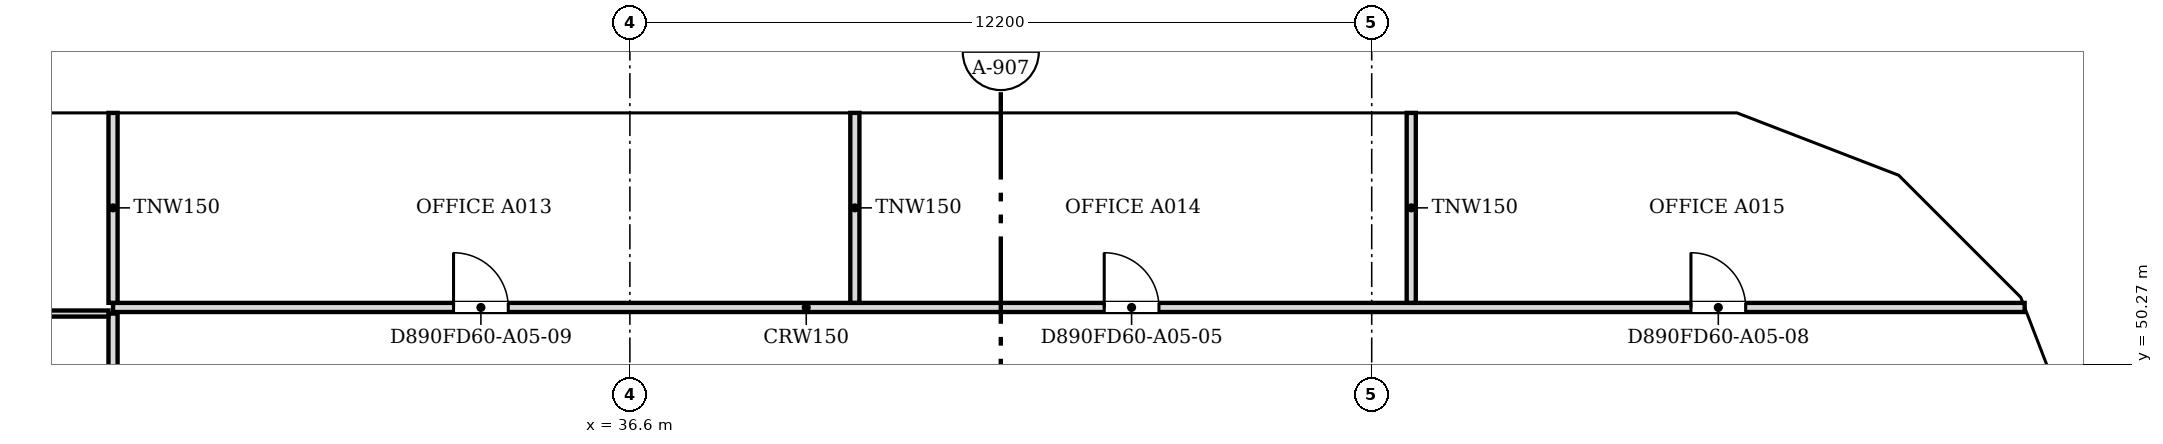
"""IFC4 building model, lengths in metres.
Left out: names, types, materials, properties, quantities, classifications, styles, units other than length and angle.
Written with IfcOpenShell. Run it as: python <this file> out.ifc"""

import sys

from ifc_helpers import new_model, si_unit, direction, frame, frame_2d, origin, place, context, subcontext, project, spatial, polyline, rectangle, outline, extrude, faceted_brep, source, transform, mapped, element, fill, save


model = new_model("IFC4")
c1 = context("Model", 3, precision=1e-05, world=origin(), true_north=direction((0.0, 1.0)))
c2 = subcontext(c1, "Body", "Model", "MODEL_VIEW")
j1 = project(units=[si_unit("LENGTHUNIT", "METRE"), si_unit("PLANEANGLEUNIT", "RADIAN")], contexts=[c1])
p1 = place(None, origin())
s1 = spatial("IfcSite", under=j1, at=p1, CompositionType="ELEMENT")
p2 = place(p1, origin())
s2 = spatial("IfcBuilding", under=s1, at=p2, CompositionType="ELEMENT")
p3 = place(p2, frame((0.0, 0.0, 60.0)))
s3 = spatial("IfcBuildingStorey", under=s2, at=p3, CompositionType="ELEMENT", Elevation=60.0)
m1 = source(origin(), c2, "Body", "Brep", [
    faceted_brep([(0.047, -0.25, 0.0), (2.997, -0.25, 3.8), (0.047, -0.25, 7.6), (0.0, -0.25, 7.541), (0.0, -0.25, 0.059), (0.093, 0.25, 7.54), (2.944, 0.25, 3.868), (2.944, 0.25, 3.732), (0.093, 0.25, 0.06), (2.997, 0.0, 3.8), (0.047, 0.0, 0.0), (0.047, 0.0, 7.6)], [[[0, 1, 2, 3, 4]], [[5, 6, 7, 8]], [[8, 7, 9, 1, 0, 10]], [[6, 5, 11, 2, 1, 9]], [[3, 2, 11]], [[10, 0, 4]], [[8, 10, 4, 3, 11, 5]], [[9, 7, 6]]]),
])
p4 = place(p3, frame((60.767, 48.71, -3.8), z_axis=(0.0, 0.0, 1.0), x_axis=(-0.359901446078, 0.932990326376, 0.0)))
e1 = element("IfcWall", 1, at=p4, inside=s3, PredefinedType="SOLIDWALL", context=c2, shape_type="MappedRepresentation", body=[
    mapped(m1, transform((0.0, 0.0, 0.0), scale=1.0)),
])
m2 = source(origin(), c2, "Body", "SweptSolid", [
    extrude(outline(polyline([(0.247, 0.665), (2.681, 3.8), (0.247, 6.935), (0.247, 0.665)])), frame((0.0, 0.26, 0.0), z_axis=(0.0, -1.0, 0.0), x_axis=(1.0, 0.0, 0.0)), (0.0, 0.0, 1.0), 0.52),
])
p5 = place(p4, origin())
e2 = element("IfcOpeningElement", 2, at=p5, cuts=e1, PredefinedType="OPENING", context=c2, shape_type="MappedRepresentation", body=[
    mapped(m2, transform((0.0, 0.0, 0.0), scale=1.0)),
])
m3 = source(origin(), c2, "Body", "Brep", [
    faceted_brep([(2.944, -0.25, 0.0), (2.997, -0.25, 0.068), (2.997, -0.25, 7.532), (2.944, -0.25, 7.6), (0.0, -0.25, 3.8), (0.053, 0.25, 3.868), (2.891, 0.25, 7.532), (2.891, 0.25, 0.068), (0.053, 0.25, 3.732), (2.944, 0.0, 0.0), (2.944, 0.0, 7.6), (0.0, 0.0, 3.8)], [[[0, 1, 2, 3, 4]], [[5, 6, 7, 8]], [[1, 0, 9]], [[10, 3, 2]], [[6, 5, 11, 4, 3, 10]], [[8, 7, 9, 0, 4, 11]], [[8, 11, 5]], [[1, 9, 7, 6, 10, 2]]]),
])
p6 = place(p3, frame((59.688, 51.506, -3.8), z_axis=(0.0, 0.0, 1.0), x_axis=(-0.707106781187, 0.707106781187, 0.0)))
e3 = element("IfcWall", 3, at=p6, inside=s3, PredefinedType="SOLIDWALL", context=c2, shape_type="MappedRepresentation", body=[
    mapped(m3, transform((0.0, 0.0, 0.0), scale=1.0)),
])
m4 = source(origin(), c2, "Body", "SweptSolid", [
    extrude(outline(polyline([(2.744, 6.934), (0.316, 3.8), (2.744, 0.666), (2.744, 6.934)])), frame((0.0, 0.26, 0.0), z_axis=(0.0, -1.0, 0.0), x_axis=(1.0, 0.0, 0.0)), (0.0, 0.0, 1.0), 0.52),
])
p7 = place(p6, origin())
e4 = element("IfcOpeningElement", 4, at=p7, cuts=e3, PredefinedType="OPENING", context=c2, shape_type="MappedRepresentation", body=[
    mapped(m4, transform((0.0, 0.0, 0.0), scale=1.0)),
])
m5 = source(origin(), c2, "Body", "Brep", [
    faceted_brep([(0.053, -0.25, 0.0), (3.003, -0.25, 3.8), (0.053, -0.25, 7.6), (0.0, -0.25, 7.532), (0.0, -0.25, 0.068), (0.106, 0.25, 7.532), (2.957, 0.25, 3.86), (2.957, 0.25, 3.74), (0.106, 0.25, 0.068), (3.003, 0.0, 3.8), (0.053, 0.0, 0.0), (0.053, 0.0, 7.6)], [[[0, 1, 2, 3, 4]], [[5, 6, 7, 8]], [[8, 7, 9, 1, 0, 10]], [[6, 5, 11, 2, 1, 9]], [[3, 2, 11]], [[10, 0, 4]], [[8, 10, 4, 3, 11, 5]], [[9, 7, 6]]]),
])
p8 = place(p3, frame((57.656, 53.569, -3.8), z_axis=(0.0, 0.0, 1.0), x_axis=(-0.933007896601, 0.359855894603, 0.0)))
e5 = element("IfcWall", 5, at=p8, inside=s3, PredefinedType="SOLIDWALL", context=c2, shape_type="MappedRepresentation", body=[
    mapped(m5, transform((0.0, 0.0, 0.0), scale=1.0)),
])
m6 = source(origin(), c2, "Body", "SweptSolid", [
    extrude(outline(polyline([(0.253, 0.665), (2.687, 3.8), (0.253, 6.935), (0.253, 0.665)])), frame((0.0, 0.26, 0.0), z_axis=(0.0, -1.0, 0.0), x_axis=(1.0, 0.0, 0.0)), (0.0, 0.0, 1.0), 0.52),
])
p9 = place(p8, origin())
e6 = element("IfcOpeningElement", 6, at=p9, cuts=e5, PredefinedType="OPENING", context=c2, shape_type="MappedRepresentation", body=[
    mapped(m6, transform((0.0, 0.0, 0.0), scale=1.0)),
])
m7 = source(origin(), c2, "Body", "Brep", [
    faceted_brep([(3.003, -0.25, 0.0), (6.053, -0.25, 3.8), (3.003, -0.25, 7.6), (0.0, -0.25, 3.8), (0.047, 0.25, 3.859), (3.003, 0.25, 7.6), (6.053, 0.25, 3.8), (3.003, 0.25, 0.0), (0.047, 0.25, 3.741), (0.0, 0.0, 3.8)], [[[0, 1, 2, 3]], [[4, 5, 6, 7, 8]], [[7, 6, 1, 0]], [[6, 5, 2, 1]], [[5, 4, 9, 3, 2]], [[8, 7, 0, 3, 9]], [[8, 9, 4]]]),
])
p10 = place(p3, frame((54.854, 54.65, -3.8), z_axis=(0.0, 0.0, 1.0), x_axis=(-1.0, 0.0, 0.0)))
e7 = element("IfcWall", 7, at=p10, inside=s3, PredefinedType="SOLIDWALL", context=c2, shape_type="MappedRepresentation", body=[
    mapped(m7, transform((0.0, 0.0, 0.0), scale=1.0)),
])
m8 = source(origin(), c2, "Body", "SweptSolid", [
    extrude(outline(polyline([(3.005, 0.401), (5.733, 3.8), (3.005, 7.199), (0.319, 3.8), (3.005, 0.401)])), frame((0.0, 0.26, 0.0), z_axis=(0.0, -1.0, 0.0), x_axis=(1.0, 0.0, 0.0)), (0.0, 0.0, 1.0), 0.52),
])
p11 = place(p10, origin())
e8 = element("IfcOpeningElement", 8, at=p11, cuts=e7, PredefinedType="OPENING", context=c2, shape_type="MappedRepresentation", body=[
    mapped(m8, transform((0.0, 0.0, 0.0), scale=1.0)),
])
m9 = source(origin(), c2, "Body", "SweptSolid", [
    extrude(outline(polyline([(3.05, 0.0), (6.1, 3.8), (3.05, 7.6), (0.0, 3.8), (3.05, 0.0)])), frame((0.0, 0.25, 0.0), z_axis=(0.0, -1.0, 0.0), x_axis=(1.0, 0.0, 0.0)), (0.0, 0.0, 1.0), 0.5),
])
p12 = place(p3, frame((48.8, 54.65, -3.8), z_axis=(0.0, 0.0, 1.0), x_axis=(-1.0, 0.0, 0.0)))
e9 = element("IfcWall", 9, at=p12, inside=s3, PredefinedType="SOLIDWALL", context=c2, shape_type="MappedRepresentation", body=[
    mapped(m9, transform((0.0, 0.0, 0.0), scale=1.0)),
])
m10 = source(origin(), c2, "Body", "SweptSolid", [
    extrude(outline(polyline([(3.05, 0.399), (5.78, 3.8), (3.05, 7.201), (0.321, 3.8), (3.05, 0.399)])), frame((0.0, 0.26, 0.0), z_axis=(0.0, -1.0, 0.0), x_axis=(1.0, 0.0, 0.0)), (0.0, 0.0, 1.0), 0.52),
])
p13 = place(p12, origin())
e10 = element("IfcOpeningElement", 10, at=p13, cuts=e9, PredefinedType="OPENING", context=c2, shape_type="MappedRepresentation", body=[
    mapped(m10, transform((0.0, 0.0, 0.0), scale=1.0)),
])
m11 = source(origin(), c2, "Body", "Brep", [
    faceted_brep([(3.05, -0.25, 0.0), (6.1, -0.25, 3.8), (6.1, -0.25, 3.8), (3.05, -0.25, 7.6), (0.0, -0.25, 3.8), (0.0, 0.25, 3.8), (3.05, 0.25, 7.6), (6.1, 0.25, 3.8), (6.1, 0.25, 3.8), (3.05, 0.25, 0.0)], [[[0, 1, 2, 3, 4]], [[5, 6, 7, 8, 9]], [[9, 8, 1, 0]], [[7, 6, 3, 2]], [[6, 5, 4, 3]], [[5, 9, 0, 4]], [[1, 8, 7, 2]]]),
])
p14 = place(p3, frame((42.7, 54.65, -3.8), z_axis=(0.0, 0.0, 1.0), x_axis=(-1.0, 0.0, 0.0)))
e11 = element("IfcWall", 11, at=p14, inside=s3, PredefinedType="SOLIDWALL", context=c2, shape_type="MappedRepresentation", body=[
    mapped(m11, transform((0.0, 0.0, 0.0), scale=1.0)),
])
p15 = place(p14, origin())
e12 = element("IfcOpeningElement", 12, at=p15, cuts=e11, PredefinedType="OPENING", context=c2, shape_type="MappedRepresentation", body=[
    mapped(m10, transform((0.0, 0.0, 0.0), scale=1.0)),
])
p16 = place(p3, frame((36.6, 54.65, -3.8), z_axis=(0.0, 0.0, 1.0), x_axis=(-1.0, 0.0, 0.0)))
e13 = element("IfcWall", 13, at=p16, inside=s3, PredefinedType="SOLIDWALL", context=c2, shape_type="MappedRepresentation", body=[
    mapped(m9, transform((0.0, 0.0, 0.0), scale=1.0)),
])
p17 = place(p16, origin())
e14 = element("IfcOpeningElement", 14, at=p17, cuts=e13, PredefinedType="OPENING", context=c2, shape_type="MappedRepresentation", body=[
    mapped(m10, transform((0.0, 0.0, 0.0), scale=1.0)),
])
p18 = place(p3, frame((30.5, 54.65, -3.8), z_axis=(0.0, 0.0, 1.0), x_axis=(-1.0, 0.0, 0.0)))
e15 = element("IfcWall", 15, at=p18, inside=s3, PredefinedType="SOLIDWALL", context=c2, shape_type="MappedRepresentation", body=[
    mapped(m9, transform((0.0, 0.0, 0.0), scale=1.0)),
])
p19 = place(p18, origin())
e16 = element("IfcOpeningElement", 16, at=p19, cuts=e15, PredefinedType="OPENING", context=c2, shape_type="MappedRepresentation", body=[
    mapped(m10, transform((0.0, 0.0, 0.0), scale=1.0)),
])
m12 = source(origin(), c2, "Body", "Brep", [
    faceted_brep([(2.95, -0.25, 0.0), (3.003, -0.25, 0.068), (3.003, -0.25, 3.8), (0.0, -0.25, 3.8), (0.047, 0.25, 3.8), (2.898, 0.25, 3.8), (2.898, 0.25, 0.068), (0.047, 0.25, 3.74), (2.95, 0.0, 0.0), (0.0, 0.0, 3.8)], [[[0, 1, 2, 3]], [[4, 5, 6, 7]], [[1, 0, 8]], [[5, 4, 9, 3, 2]], [[7, 6, 8, 0, 3, 9]], [[7, 9, 4]], [[1, 8, 6, 5, 2]]]),
])
p20 = place(p3, frame((60.75, 48.753, 0.0), z_axis=(0.0, 0.0, 1.0), x_axis=(-0.35992665181, 0.932980602862, 0.0)))
e17 = element("IfcWall", 17, at=p20, inside=s3, PredefinedType="SOLIDWALL", context=c2, shape_type="MappedRepresentation", body=[
    mapped(m12, transform((0.0, 0.0, 0.0), scale=1.0)),
])
m13 = source(origin(), c2, "Body", "SweptSolid", [
    extrude(outline(polyline([(2.75, 3.55), (0.511, 3.55), (2.75, 0.665), (2.75, 3.55)])), frame((0.0, 0.26, 0.0), z_axis=(0.0, -1.0, 0.0), x_axis=(1.0, 0.0, 0.0)), (0.0, 0.0, 1.0), 0.52),
])
p21 = place(p20, origin())
e18 = element("IfcOpeningElement", 18, at=p21, cuts=e17, PredefinedType="OPENING", context=c2, shape_type="MappedRepresentation", body=[
    mapped(m13, transform((0.0, 0.0, 0.0), scale=1.0)),
])
m14 = source(origin(), c2, "Body", "Brep", [
    faceted_brep([(0.053, -0.25, 0.0), (2.997, -0.25, 3.8), (0.0, -0.25, 3.8), (0.0, -0.25, 0.068), (0.106, 0.25, 3.8), (2.944, 0.25, 3.8), (2.944, 0.25, 3.732), (0.106, 0.25, 0.068), (2.997, 0.0, 3.8), (0.053, 0.0, 0.0)], [[[0, 1, 2, 3]], [[4, 5, 6, 7]], [[7, 6, 8, 1, 0, 9]], [[5, 4, 2, 1, 8]], [[9, 0, 3]], [[7, 9, 3, 2, 4]], [[6, 5, 8]]]),
])
p22 = place(p3, frame((59.726, 51.469, 0.0), z_axis=(0.0, 0.0, 1.0), x_axis=(-0.707106781187, 0.707106781187, 0.0)))
e19 = element("IfcWall", 19, at=p22, inside=s3, PredefinedType="SOLIDWALL", context=c2, shape_type="MappedRepresentation", body=[
    mapped(m14, transform((0.0, 0.0, 0.0), scale=1.0)),
])
m15 = source(origin(), c2, "Body", "SweptSolid", [
    extrude(outline(polyline([(0.253, 0.666), (2.487, 3.55), (0.253, 3.55), (0.253, 0.666)])), frame((0.0, 0.26, 0.0), z_axis=(0.0, -1.0, 0.0), x_axis=(1.0, 0.0, 0.0)), (0.0, 0.0, 1.0), 0.52),
])
p23 = place(p22, origin())
e20 = element("IfcOpeningElement", 20, at=p23, cuts=e19, PredefinedType="OPENING", context=c2, shape_type="MappedRepresentation", body=[
    mapped(m15, transform((0.0, 0.0, 0.0), scale=1.0)),
])
m16 = source(origin(), c2, "Body", "Brep", [
    faceted_brep([(2.95, -0.25, 0.0), (2.997, -0.25, 0.059), (2.997, -0.25, 3.8), (0.0, -0.25, 3.8), (0.053, 0.25, 3.8), (2.904, 0.25, 3.8), (2.904, 0.25, 0.06), (0.053, 0.25, 3.732), (2.95, 0.0, 0.0), (0.0, 0.0, 3.8)], [[[0, 1, 2, 3]], [[4, 5, 6, 7]], [[1, 0, 8]], [[5, 4, 9, 3, 2]], [[7, 6, 8, 0, 3, 9]], [[7, 9, 4]], [[1, 8, 6, 5, 2]]]),
])
p24 = place(p3, frame((57.606, 53.588, 0.0), z_axis=(0.0, 0.0, 1.0), x_axis=(-0.932990326376, 0.359901446078, 0.0)))
e21 = element("IfcWall", 21, at=p24, inside=s3, PredefinedType="SOLIDWALL", context=c2, shape_type="MappedRepresentation", body=[
    mapped(m16, transform((0.0, 0.0, 0.0), scale=1.0)),
])
p25 = place(p24, origin())
e22 = element("IfcOpeningElement", 22, at=p25, cuts=e21, PredefinedType="OPENING", context=c2, shape_type="MappedRepresentation", body=[
    mapped(m13, transform((0.0, 0.0, 0.0), scale=1.0)),
])
m17 = source(origin(), c2, "Body", "Brep", [
    faceted_brep([(0.047, -0.25, 0.0), (3.05, -0.25, 3.8), (0.0, -0.25, 3.8), (0.0, -0.25, 0.06), (0.093, 0.25, 3.8), (3.05, 0.25, 3.8), (0.093, 0.25, 0.059), (0.047, 0.0, 0.0)], [[[0, 1, 2, 3]], [[4, 5, 6]], [[6, 5, 1, 0, 7]], [[5, 4, 2, 1]], [[7, 0, 3]], [[6, 7, 3, 2, 4]]]),
])
p26 = place(p3, frame((54.9, 54.65, 0.0), z_axis=(0.0, 0.0, 1.0), x_axis=(-1.0, 0.0, 0.0)))
e23 = element("IfcWall", 23, at=p26, inside=s3, PredefinedType="SOLIDWALL", context=c2, shape_type="MappedRepresentation", body=[
    mapped(m17, transform((0.0, 0.0, 0.0), scale=1.0)),
])
m18 = source(origin(), c2, "Body", "SweptSolid", [
    extrude(outline(polyline([(0.247, 0.656), (2.534, 3.55), (0.247, 3.55), (0.247, 0.656)])), frame((0.0, 0.26, 0.0), z_axis=(0.0, -1.0, 0.0), x_axis=(1.0, 0.0, 0.0)), (0.0, 0.0, 1.0), 0.52),
])
p27 = place(p26, origin())
e24 = element("IfcOpeningElement", 24, at=p27, cuts=e23, PredefinedType="OPENING", context=c2, shape_type="MappedRepresentation", body=[
    mapped(m18, transform((0.0, 0.0, 0.0), scale=1.0)),
])
m19 = source(origin(), c2, "Body", "SweptSolid", [
    extrude(outline(polyline([(3.05, 0.0), (6.1, 3.8), (0.0, 3.8), (3.05, 0.0)])), frame((0.0, 0.25, 0.0), z_axis=(0.0, -1.0, 0.0), x_axis=(1.0, 0.0, 0.0)), (0.0, 0.0, 1.0), 0.5),
])
p28 = place(p3, frame((51.85, 54.65, 0.0), z_axis=(0.0, 0.0, 1.0), x_axis=(-1.0, 0.0, 0.0)))
e25 = element("IfcWall", 25, at=p28, inside=s3, PredefinedType="SOLIDWALL", context=c2, shape_type="MappedRepresentation", body=[
    mapped(m19, transform((0.0, 0.0, 0.0), scale=1.0)),
])
m20 = source(origin(), c2, "Body", "SweptSolid", [
    extrude(outline(polyline([(3.05, 0.399), (5.579, 3.55), (0.521, 3.55), (3.05, 0.399)])), frame((0.0, 0.26, 0.0), z_axis=(0.0, -1.0, 0.0), x_axis=(1.0, 0.0, 0.0)), (0.0, 0.0, 1.0), 0.52),
])
p29 = place(p28, origin())
e26 = element("IfcOpeningElement", 26, at=p29, cuts=e25, PredefinedType="OPENING", context=c2, shape_type="MappedRepresentation", body=[
    mapped(m20, transform((0.0, 0.0, 0.0), scale=1.0)),
])
p30 = place(p3, frame((45.75, 54.65, 0.0), z_axis=(0.0, 0.0, 1.0), x_axis=(-1.0, 0.0, 0.0)))
e27 = element("IfcWall", 27, at=p30, inside=s3, PredefinedType="SOLIDWALL", context=c2, shape_type="MappedRepresentation", body=[
    mapped(m19, transform((0.0, 0.0, 0.0), scale=1.0)),
])
p31 = place(p30, origin())
e28 = element("IfcOpeningElement", 28, at=p31, cuts=e27, PredefinedType="OPENING", context=c2, shape_type="MappedRepresentation", body=[
    mapped(m20, transform((0.0, 0.0, 0.0), scale=1.0)),
])
m21 = source(origin(), c2, "Body", "Brep", [
    faceted_brep([(3.05, -0.25, 0.0), (6.1, -0.25, 3.8), (6.1, -0.25, 3.8), (0.0, -0.25, 3.8), (0.0, 0.25, 3.8), (6.1, 0.25, 3.8), (6.1, 0.25, 3.8), (3.05, 0.25, 0.0)], [[[0, 1, 2, 3]], [[4, 5, 6, 7]], [[7, 6, 1, 0]], [[5, 4, 3, 2]], [[4, 7, 0, 3]], [[1, 6, 5, 2]]]),
])
p32 = place(p3, frame((39.65, 54.65, 0.0), z_axis=(0.0, 0.0, 1.0), x_axis=(-1.0, 0.0, 0.0)))
e29 = element("IfcWall", 29, at=p32, inside=s3, PredefinedType="SOLIDWALL", context=c2, shape_type="MappedRepresentation", body=[
    mapped(m21, transform((0.0, 0.0, 0.0), scale=1.0)),
])
p33 = place(p32, origin())
e30 = element("IfcOpeningElement", 30, at=p33, cuts=e29, PredefinedType="OPENING", context=c2, shape_type="MappedRepresentation", body=[
    mapped(m20, transform((0.0, 0.0, 0.0), scale=1.0)),
])
p34 = place(p3, frame((33.55, 54.65, 0.0), z_axis=(0.0, 0.0, 1.0), x_axis=(-1.0, 0.0, 0.0)))
e31 = element("IfcWall", 31, at=p34, inside=s3, PredefinedType="SOLIDWALL", context=c2, shape_type="MappedRepresentation", body=[
    mapped(m19, transform((0.0, 0.0, 0.0), scale=1.0)),
])
p35 = place(p34, origin())
e32 = element("IfcOpeningElement", 32, at=p35, cuts=e31, PredefinedType="OPENING", context=c2, shape_type="MappedRepresentation", body=[
    mapped(m20, transform((0.0, 0.0, 0.0), scale=1.0)),
])
p36 = place(p3, frame((27.45, 54.65, 0.0), z_axis=(0.0, 0.0, 1.0), x_axis=(-1.0, 0.0, 0.0)))
e33 = element("IfcWall", 33, at=p36, inside=s3, PredefinedType="SOLIDWALL", context=c2, shape_type="MappedRepresentation", body=[
    mapped(m21, transform((0.0, 0.0, 0.0), scale=1.0)),
])
p37 = place(p36, origin())
e34 = element("IfcOpeningElement", 34, at=p37, cuts=e33, PredefinedType="OPENING", context=c2, shape_type="MappedRepresentation", body=[
    mapped(m20, transform((0.0, 0.0, 0.0), scale=1.0)),
])
p38 = place(p3, frame((28.1, 47.776, 0.0), z_axis=(0.0, 0.0, 1.0), x_axis=(0.0, 1.0, 0.0)))
e35 = element("IfcWall", 35, at=p38, inside=s3, PredefinedType="PARTITIONING", context=c2, shape_type="SweptSolid", body=[
    extrude(rectangle(XDim=3.324, YDim=0.15, at=frame_2d((1.662, 0.0))), origin(), (0.0, 0.0, 1.0), 2.888),
])
p39 = place(p3, frame((19.776, 51.1, 0.0), z_axis=(0.0, 0.0, 1.0), x_axis=(1.0, 0.0, 0.0)))
e36 = element("IfcWall", 36, at=p39, inside=s3, PredefinedType="PARTITIONING", context=c2, shape_type="SweptSolid", body=[
    extrude(rectangle(XDim=8.248, YDim=0.1, at=frame_2d((4.124, 0.0))), origin(), (0.0, 0.0, 1.0), 2.888),
])
m22 = source(origin(), c2, "Body", "SweptSolid", [
    extrude(rectangle(XDim=0.9, YDim=2.1, at=frame_2d((0.45, 1.05))), frame((0.0, 0.06, 0.0), z_axis=(0.0, -1.0, 0.0), x_axis=(1.0, 0.0, 0.0)), (0.0, 0.0, 1.0), 0.12),
])
p40 = place(p39, frame((1.5, 0.0, 0.0)))
e37 = element("IfcOpeningElement", 37, at=p40, cuts=e36, PredefinedType="OPENING", context=c2, shape_type="MappedRepresentation", body=[
    mapped(m22, transform((0.0, 0.0, 0.0), scale=1.0)),
])
p41 = place(p39, frame((5.682, 0.0, 0.0)))
e38 = element("IfcOpeningElement", 38, at=p41, cuts=e36, PredefinedType="OPENING", context=c2, shape_type="MappedRepresentation", body=[
    mapped(m22, transform((0.0, 0.0, 0.0), scale=1.0)),
])
p42 = place(p3, frame((28.1, 51.2, 0.0), z_axis=(0.0, 0.0, 1.0), x_axis=(1.0, 0.0, 0.0)))
e39 = element("IfcWall", 39, at=p42, inside=s3, PredefinedType="PARTITIONING", context=c2, shape_type="SweptSolid", body=[
    extrude(rectangle(XDim=31.438, YDim=0.15, at=frame_2d((15.719, 0.0))), origin(), (0.0, 0.0, 1.0), 2.888),
])
m23 = source(origin(), c2, "Body", "SweptSolid", [
    extrude(rectangle(XDim=0.9, YDim=2.1, at=frame_2d((0.45, 1.05))), frame((0.0, 0.085, 0.0), z_axis=(0.0, -1.0, 0.0), x_axis=(1.0, 0.0, 0.0)), (0.0, 0.0, 1.0), 0.17),
])
p43 = place(p42, frame((16.301, 0.0, 0.0)))
e40 = element("IfcOpeningElement", 40, at=p43, cuts=e39, PredefinedType="OPENING", context=c2, shape_type="MappedRepresentation", body=[
    mapped(m23, transform((0.0, 0.0, 0.0), scale=1.0)),
])
p44 = place(p42, frame((25.95, 0.0, 0.0)))
e41 = element("IfcOpeningElement", 41, at=p44, cuts=e39, PredefinedType="OPENING", context=c2, shape_type="MappedRepresentation", body=[
    mapped(m23, transform((0.0, 0.0, 0.0), scale=1.0)),
])
p45 = place(p42, frame((5.6, 0.0, 0.0)))
e42 = element("IfcOpeningElement", 42, at=p45, cuts=e39, PredefinedType="OPENING", context=c2, shape_type="MappedRepresentation", body=[
    mapped(m23, transform((0.0, 0.0, 0.0), scale=1.0)),
])
for number, where, z_axis, x_axis in (
    (43, (28.1, 51.276, 0.0), (0.0, 0.0, 1.0), (0.0, 1.0, 0.0)),
    (44, (40.3, 51.276, 0.0), (0.0, 0.0, 1.0), (0.0, 1.0, 0.0)),
    (45, (49.45, 51.276, 0.0), (0.0, 0.0, 1.0), (0.0, 1.0, 0.0)),
):
    element("IfcWall", number, at=place(p3, frame(where, z_axis=z_axis, x_axis=x_axis)), inside=s3, PredefinedType="PARTITIONING", context=c2, shape_type="SweptSolid", body=[
        extrude(rectangle(XDim=3.124, YDim=0.15, at=frame_2d((1.562, 0.0))), origin(), (0.0, 0.0, 1.0), 2.888),
    ])
m24 = source(origin(), c2, "Body", "SweptSolid", [
    extrude(rectangle(XDim=0.9, YDim=2.1, at=frame_2d((0.45, 1.05))), frame((0.0, 0.025, 0.0), z_axis=(0.0, -1.0, 0.0), x_axis=(1.0, 0.0, 0.0)), (0.0, 0.0, 1.0), 0.05),
])
p46 = place(p43, origin())
e46 = element("IfcDoor", 46, at=p46, inside=s3, OperationType="SINGLE_SWING_LEFT", PredefinedType="DOOR", context=c2, shape_type="MappedRepresentation", body=[
    mapped(m24, transform((0.0, 0.0, 0.0), scale=1.0)),
])
fill(e40, e46)
p47 = place(p44, origin())
e47 = element("IfcDoor", 47, at=p47, inside=s3, OperationType="SINGLE_SWING_LEFT", PredefinedType="DOOR", context=c2, shape_type="MappedRepresentation", body=[
    mapped(m24, transform((0.0, 0.0, 0.0), scale=1.0)),
])
fill(e41, e47)
p48 = place(p45, origin())
e48 = element("IfcDoor", 48, at=p48, inside=s3, OperationType="SINGLE_SWING_LEFT", PredefinedType="DOOR", context=c2, shape_type="MappedRepresentation", body=[
    mapped(m24, transform((0.0, 0.0, 0.0), scale=1.0)),
])
fill(e42, e48)
save(model, sys.argv[1])
